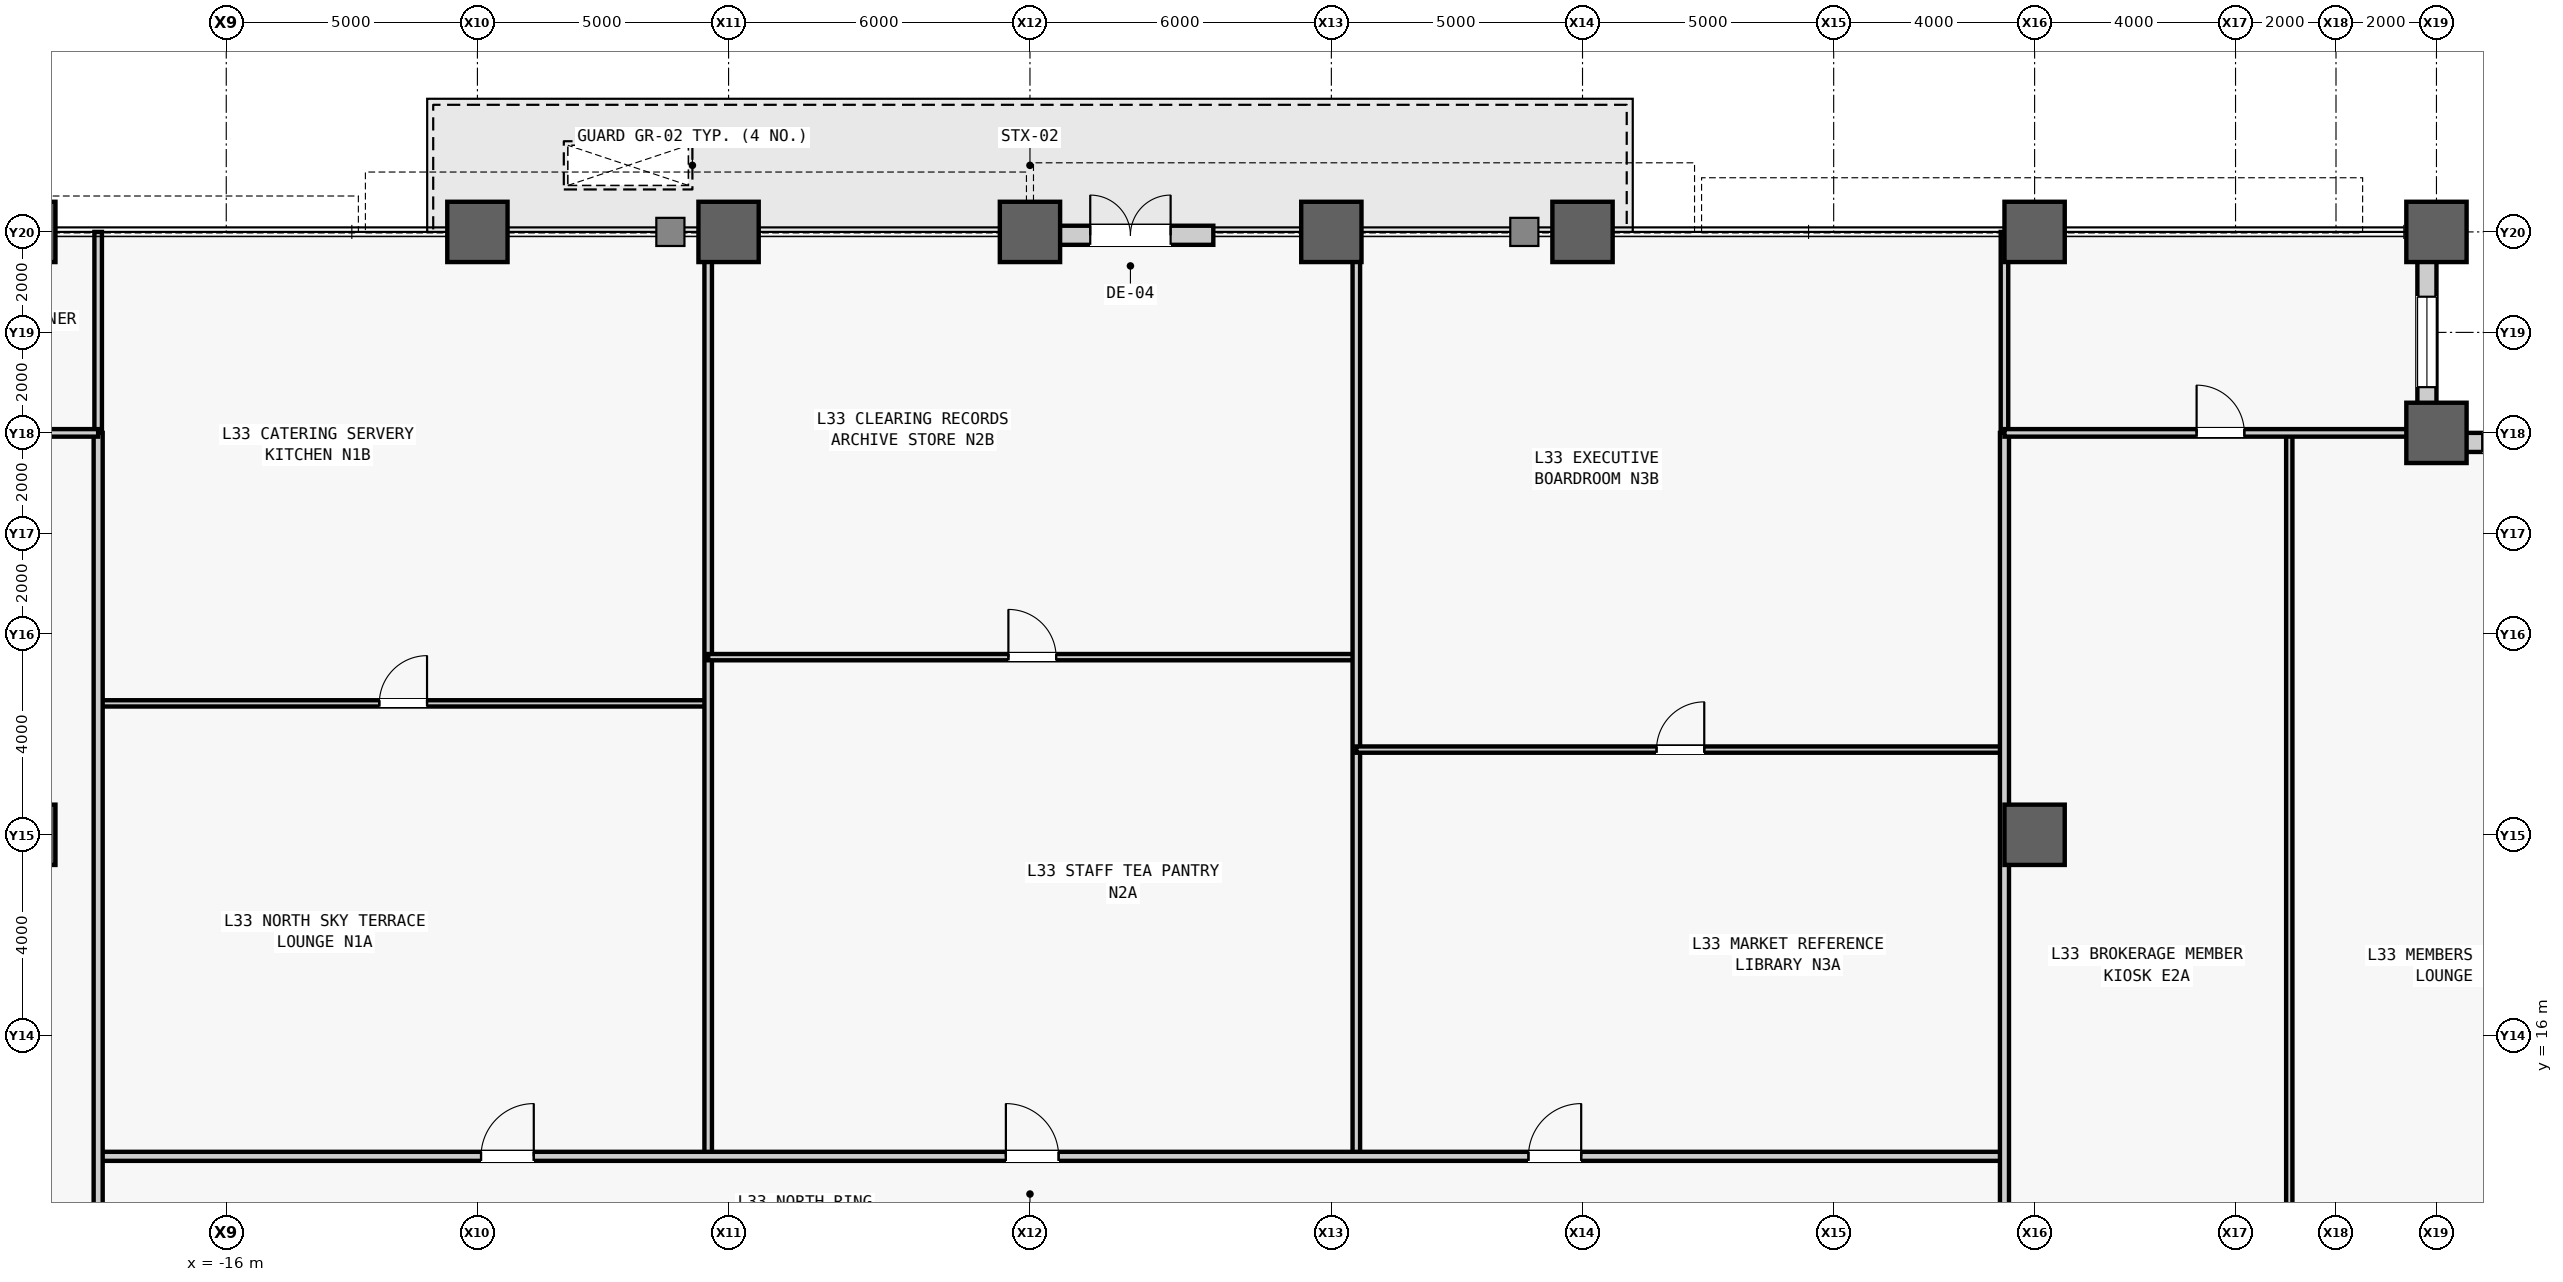
"""IFC4 building model, lengths in metres.
Left out: names, types, materials, properties, quantities, classifications, styles, units other than length and angle.
Written with IfcOpenShell. Run it as: python <this file> out.ifc"""

import sys

from ifc_helpers import new_model, si_unit, direction, frame, frame_2d, origin, origin_2d, place, context, subcontext, project, spatial, rectangle, hollow_rectangle, extrude, source, transform, mapped, element, fill, save


model = new_model("IFC4")
c1 = context("Model", 3, precision=1e-05, world=origin(), true_north=direction((0.0, 1.0)))
c2 = subcontext(c1, "Body", "Model", "MODEL_VIEW")
j1 = project(units=[si_unit("LENGTHUNIT", "METRE"), si_unit("PLANEANGLEUNIT", "RADIAN")], contexts=[c1])
p1 = place(None, origin())
s1 = spatial("IfcSite", under=j1, at=p1, CompositionType="ELEMENT")
p2 = place(p1, origin())
s2 = spatial("IfcBuilding", under=s1, at=p2, CompositionType="ELEMENT")
p3 = place(p2, frame((0.0, 0.0, 144.7)))
s3 = spatial("IfcBuildingStorey", under=s2, at=p3, CompositionType="ELEMENT", Elevation=144.7)
m1 = source(origin(), c2, "Body", "SweptSolid", [
    extrude(hollow_rectangle(XDim=1.2, YDim=1.2, WallThickness=0.07, at=origin_2d()), origin(), (0.0, 0.0, 1.0), 5.2),
])
for number, where, z_axis, x_axis in (
    (1, (-20.0, 20.0, 0.0), (0.0, 0.0, 1.0), (1.0, 0.0, 0.0)),
    (2, (-20.0, 32.0, 0.0), (0.0, 0.0, 1.0), (1.0, 0.0, 0.0)),
    (3, (-11.0, 32.0, 0.0), (0.0, 0.0, 1.0), (1.0, 0.0, 0.0)),
    (4, (-6.0, 32.0, 0.0), (0.0, 0.0, 1.0), (1.0, 0.0, 0.0)),
    (5, (0.0, 32.0, 0.0), (0.0, 0.0, 1.0), (1.0, 0.0, 0.0)),
    (6, (6.0, 32.0, 0.0), (0.0, 0.0, 1.0), (1.0, 0.0, 0.0)),
    (7, (11.0, 32.0, 0.0), (0.0, 0.0, 1.0), (1.0, 0.0, 0.0)),
    (8, (20.0, 20.0, 0.0), (0.0, 0.0, 1.0), (1.0, 0.0, 0.0)),
    (9, (20.0, 32.0, 0.0), (0.0, 0.0, 1.0), (1.0, 0.0, 0.0)),
    (10, (28.0, 28.0, 0.0), (0.0, 0.0, 1.0), (1.0, 0.0, 0.0)),
    (11, (28.0, 32.0, 0.0), (0.0, 0.0, 1.0), (1.0, 0.0, 0.0)),
):
    element("IfcColumn", number, at=place(p3, frame(where, z_axis=z_axis, x_axis=x_axis)), inside=s3, PredefinedType="COLUMN", context=c2, shape_type="MappedRepresentation", body=[
        mapped(m1, transform((0.0, 0.0, 0.0), scale=1.0)),
    ])
m2 = source(origin(), c2, "Body", "SweptSolid", [
    extrude(rectangle(XDim=3.62, YDim=0.38, at=frame_2d((1.81, 0.0))), origin(), (0.0, 0.0, 1.0), 3.905),
])
p4 = place(p3, frame((28.0, 27.81, 0.0), z_axis=(0.0, 0.0, 1.0), x_axis=(1.0, 0.0, 0.0)))
e12 = element("IfcWall", 12, at=p4, inside=s3, PredefinedType="STANDARD", context=c2, shape_type="MappedRepresentation", body=[
    mapped(m2, transform((0.0, 0.0, 0.0), scale=1.0)),
])
m3 = source(origin(), c2, "Body", "SweptSolid", [
    extrude(rectangle(XDim=1.8, YDim=2.4, at=frame_2d((0.9, 1.2))), frame((0.0, 0.2, 0.0), z_axis=(0.0, -1.0, 0.0), x_axis=(1.0, 0.0, 0.0)), (0.0, 0.0, 1.0), 0.4),
])
p5 = place(p4, frame((0.91, 0.0, 0.7)))
e13 = element("IfcOpeningElement", 13, at=p5, cuts=e12, PredefinedType="OPENING", context=c2, shape_type="MappedRepresentation", body=[
    mapped(m3, transform((0.0, 0.0, 0.0), scale=1.0)),
])
p6 = place(p3, frame((27.81, 28.0, 0.0), z_axis=(0.0, 0.0, 1.0), x_axis=(0.0, 1.0, 0.0)))
e14 = element("IfcWall", 14, at=p6, inside=s3, PredefinedType="STANDARD", context=c2, shape_type="MappedRepresentation", body=[
    mapped(m2, transform((0.0, 0.0, 0.0), scale=1.0)),
])
p7 = place(p6, frame((0.91, 0.0, 0.7)))
e15 = element("IfcOpeningElement", 15, at=p7, cuts=e14, PredefinedType="OPENING", context=c2, shape_type="MappedRepresentation", body=[
    mapped(m3, transform((0.0, 0.0, 0.0), scale=1.0)),
])
m4 = source(origin(), c2, "Body", "SweptSolid", [
    extrude(rectangle(XDim=3.3, YDim=0.38, at=frame_2d((1.65, 0.0))), origin(), (0.0, 0.0, 1.0), 3.905),
])
p8 = place(p3, frame((0.35, 31.933, 0.0), z_axis=(0.0, 0.0, 1.0), x_axis=(1.0, 0.0, 0.0)))
e16 = element("IfcWall", 16, at=p8, inside=s3, PredefinedType="STANDARD", context=c2, shape_type="MappedRepresentation", body=[
    mapped(m4, transform((0.0, 0.0, 0.0), scale=1.0)),
])
m5 = source(origin(), c2, "Body", "SweptSolid", [
    extrude(rectangle(XDim=1.6, YDim=2.25, at=frame_2d((0.8, 1.125))), frame((0.0, 0.2, 0.0), z_axis=(0.0, -1.0, 0.0), x_axis=(1.0, 0.0, 0.0)), (0.0, 0.0, 1.0), 0.4),
])
p9 = place(p8, frame((0.85, 0.0, 0.0)))
e17 = element("IfcOpeningElement", 17, at=p9, cuts=e16, PredefinedType="OPENING", context=c2, shape_type="MappedRepresentation", body=[
    mapped(m5, transform((0.0, 0.0, 0.0), scale=1.0)),
])
m6 = source(origin(), c2, "Body", "SweptSolid", [
    extrude(rectangle(XDim=12.144, YDim=0.125, at=frame_2d((6.072, 0.0))), origin(), (0.0, 0.0, 1.0), 4.6),
])
p10 = place(p3, frame((-18.55, 22.616, 0.0), z_axis=(0.0, 0.0, 1.0), x_axis=(1.0, 0.0, 0.0)))
e18 = element("IfcWall", 18, at=p10, inside=s3, PredefinedType="PARTITIONING", context=c2, shape_type="MappedRepresentation", body=[
    mapped(m6, transform((0.0, 0.0, 0.0), scale=1.0)),
])
m7 = source(origin(), c2, "Body", "SweptSolid", [
    extrude(rectangle(XDim=0.95, YDim=2.15, at=frame_2d((0.475, 1.075))), frame((0.0, 0.073, 0.0), z_axis=(0.0, -1.0, 0.0), x_axis=(1.0, 0.0, 0.0)), (0.0, 0.0, 1.0), 0.145),
])
p11 = place(p10, frame((5.597, 0.0, 0.0)))
e19 = element("IfcOpeningElement", 19, at=p11, cuts=e18, PredefinedType="OPENING", context=c2, shape_type="MappedRepresentation", body=[
    mapped(m7, transform((0.0, 0.0, 0.0), scale=1.0)),
])
m8 = source(origin(), c2, "Body", "SweptSolid", [
    extrude(rectangle(XDim=18.4, YDim=0.15, at=frame_2d((9.2, 0.0))), origin(), (0.0, 0.0, 1.0), 2.8),
])
p12 = place(p3, frame((-6.406, 13.6, 0.0), z_axis=(0.0, 0.0, 1.0), x_axis=(0.0, 1.0, 0.0)))
e20 = element("IfcWall", 20, at=p12, inside=s3, PredefinedType="PARTITIONING", context=c2, shape_type="MappedRepresentation", body=[
    mapped(m8, transform((0.0, 0.0, 0.0), scale=1.0)),
])
m9 = source(origin(), c2, "Body", "SweptSolid", [
    extrude(rectangle(XDim=12.903, YDim=0.125, at=frame_2d((6.452, 0.0))), origin(), (0.0, 0.0, 1.0), 4.6),
])
p13 = place(p3, frame((-6.406, 23.536, 0.0), z_axis=(0.0, 0.0, 1.0), x_axis=(1.0, 0.0, 0.0)))
e21 = element("IfcWall", 21, at=p13, inside=s3, PredefinedType="PARTITIONING", context=c2, shape_type="MappedRepresentation", body=[
    mapped(m9, transform((0.0, 0.0, 0.0), scale=1.0)),
])
p14 = place(p13, frame((5.977, 0.0, 0.0)))
e22 = element("IfcOpeningElement", 22, at=p14, cuts=e21, PredefinedType="OPENING", context=c2, shape_type="MappedRepresentation", body=[
    mapped(m7, transform((0.0, 0.0, 0.0), scale=1.0)),
])
m10 = source(origin(), c2, "Body", "SweptSolid", [
    extrude(rectangle(XDim=18.4, YDim=0.15, at=frame_2d((9.2, 0.0))), origin(), (0.0, 0.0, 1.0), 4.6),
])
p15 = place(p3, frame((6.497, 13.6, 0.0), z_axis=(0.0, 0.0, 1.0), x_axis=(0.0, 1.0, 0.0)))
e23 = element("IfcWall", 23, at=p15, inside=s3, PredefinedType="PARTITIONING", context=c2, shape_type="MappedRepresentation", body=[
    mapped(m10, transform((0.0, 0.0, 0.0), scale=1.0)),
])
m11 = source(origin(), c2, "Body", "SweptSolid", [
    extrude(rectangle(XDim=12.903, YDim=0.125, at=frame_2d((6.451, 0.0))), origin(), (0.0, 0.0, 1.0), 4.6),
])
p16 = place(p3, frame((6.497, 21.696, 0.0), z_axis=(0.0, 0.0, 1.0), x_axis=(1.0, 0.0, 0.0)))
e24 = element("IfcWall", 24, at=p16, inside=s3, PredefinedType="PARTITIONING", context=c2, shape_type="MappedRepresentation", body=[
    mapped(m11, transform((0.0, 0.0, 0.0), scale=1.0)),
])
p17 = place(p16, frame((5.977, 0.0, 0.0)))
e25 = element("IfcOpeningElement", 25, at=p17, cuts=e24, PredefinedType="OPENING", context=c2, shape_type="MappedRepresentation", body=[
    mapped(m7, transform((0.0, 0.0, 0.0), scale=1.0)),
])
m12 = source(origin(), c2, "Body", "SweptSolid", [
    extrude(rectangle(XDim=37.95, YDim=0.18, at=frame_2d((18.975, 0.0))), origin(), (0.0, 0.0, 1.0), 4.6),
])
p18 = place(p3, frame((-18.55, 13.6, 0.0), z_axis=(0.0, 0.0, 1.0), x_axis=(1.0, 0.0, 0.0)))
e26 = element("IfcWall", 26, at=p18, inside=s3, PredefinedType="PARTITIONING", context=c2, shape_type="MappedRepresentation", body=[
    mapped(m12, transform((0.0, 0.0, 0.0), scale=1.0)),
])
m13 = source(origin(), c2, "Body", "SweptSolid", [
    extrude(rectangle(XDim=1.05, YDim=2.2, at=frame_2d((0.525, 1.1))), frame((0.0, 0.1, 0.0), z_axis=(0.0, -1.0, 0.0), x_axis=(1.0, 0.0, 0.0)), (0.0, 0.0, 1.0), 0.2),
])
p19 = place(p18, frame((7.622, 0.0, 0.0)))
e27 = element("IfcOpeningElement", 27, at=p19, cuts=e26, PredefinedType="OPENING", context=c2, shape_type="MappedRepresentation", body=[
    mapped(m13, transform((0.0, 0.0, 0.0), scale=1.0)),
])
p20 = place(p18, frame((18.071, 0.0, 0.0)))
e28 = element("IfcOpeningElement", 28, at=p20, cuts=e26, PredefinedType="OPENING", context=c2, shape_type="MappedRepresentation", body=[
    mapped(m13, transform((0.0, 0.0, 0.0), scale=1.0)),
])
p21 = place(p18, frame((28.473, 0.0, 0.0)))
e29 = element("IfcOpeningElement", 29, at=p21, cuts=e26, PredefinedType="OPENING", context=c2, shape_type="MappedRepresentation", body=[
    mapped(m13, transform((0.0, 0.0, 0.0), scale=1.0)),
])
m14 = source(origin(), c2, "Body", "SweptSolid", [
    extrude(rectangle(XDim=4.0, YDim=0.15, at=frame_2d((2.0, 0.0))), origin(), (0.0, 0.0, 1.0), 4.6),
])
for number, where, z_axis, x_axis in (
    (30, (-18.55, 28.0, 0.0), (0.0, 0.0, 1.0), (0.0, 1.0, 0.0)),
    (31, (19.4, 28.0, 0.0), (0.0, 0.0, 1.0), (0.0, 1.0, 0.0)),
):
    element("IfcWall", number, at=place(p3, frame(where, z_axis=z_axis, x_axis=x_axis)), inside=s3, PredefinedType="PARTITIONING", context=c2, shape_type="MappedRepresentation", body=[
        mapped(m14, transform((0.0, 0.0, 0.0), scale=1.0)),
    ])
m15 = source(origin(), c2, "Body", "SweptSolid", [
    extrude(rectangle(XDim=56.0, YDim=0.18, at=frame_2d((28.0, 0.0))), origin(), (0.0, 0.0, 1.0), 4.6),
])
p22 = place(p3, frame((-18.55, -28.0, 0.0), z_axis=(0.0, 0.0, 1.0), x_axis=(0.0, 1.0, 0.0)))
e32 = element("IfcWall", 32, at=p22, inside=s3, PredefinedType="PARTITIONING", context=c2, shape_type="MappedRepresentation", body=[
    mapped(m15, transform((0.0, 0.0, 0.0), scale=1.0)),
])
m16 = source(origin(), c2, "Body", "SweptSolid", [
    extrude(rectangle(XDim=0.95, YDim=2.15, at=frame_2d((0.475, 1.075))), frame((0.0, 0.1, 0.0), z_axis=(0.0, -1.0, 0.0), x_axis=(1.0, 0.0, 0.0)), (0.0, 0.0, 1.0), 0.2),
])
p23 = place(p22, frame((27.25, 0.0, 0.0)))
e33 = element("IfcOpeningElement", 33, at=p23, cuts=e32, PredefinedType="OPENING", context=c2, shape_type="MappedRepresentation", body=[
    mapped(m16, transform((0.0, 0.0, 0.0), scale=1.0)),
])
m17 = source(origin(), c2, "Body", "SweptSolid", [
    extrude(rectangle(XDim=28.83, YDim=0.125, at=frame_2d((14.415, 0.0))), origin(), (0.0, 0.0, 1.0), 2.8),
])
p24 = place(p3, frame((25.07, -0.83, 0.0), z_axis=(0.0, 0.0, 1.0), x_axis=(0.0, 1.0, 0.0)))
e34 = element("IfcWall", 34, at=p24, inside=s3, PredefinedType="PARTITIONING", context=c2, shape_type="MappedRepresentation", body=[
    mapped(m17, transform((0.0, 0.0, 0.0), scale=1.0)),
])
p25 = place(p24, frame((6.74, 0.0, 0.0)))
e35 = element("IfcOpeningElement", 35, at=p25, cuts=e34, PredefinedType="OPENING", context=c2, shape_type="MappedRepresentation", body=[
    mapped(m7, transform((0.0, 0.0, 0.0), scale=1.0)),
])
m18 = source(origin(), c2, "Body", "SweptSolid", [
    extrude(rectangle(XDim=56.0, YDim=0.18, at=frame_2d((28.0, 0.0))), origin(), (0.0, 0.0, 1.0), 4.131),
])
p26 = place(p3, frame((19.4, -28.0, 0.0), z_axis=(0.0, 0.0, 1.0), x_axis=(0.0, 1.0, 0.0)))
e36 = element("IfcWall", 36, at=p26, inside=s3, PredefinedType="PARTITIONING", context=c2, shape_type="MappedRepresentation", body=[
    mapped(m18, transform((0.0, 0.0, 0.0), scale=1.0)),
])
p27 = place(p26, frame((20.335, 0.0, 0.0)))
e37 = element("IfcOpeningElement", 37, at=p27, cuts=e36, PredefinedType="OPENING", context=c2, shape_type="MappedRepresentation", body=[
    mapped(m16, transform((0.0, 0.0, 0.0), scale=1.0)),
])
p28 = place(p26, frame((33.61, 0.0, 0.0)))
e38 = element("IfcOpeningElement", 38, at=p28, cuts=e36, PredefinedType="OPENING", context=c2, shape_type="MappedRepresentation", body=[
    mapped(m16, transform((0.0, 0.0, 0.0), scale=1.0)),
])
m19 = source(origin(), c2, "Body", "SweptSolid", [
    extrude(rectangle(XDim=9.45, YDim=0.15, at=frame_2d((4.725, 0.0))), origin(), (0.0, 0.0, 1.0), 4.6),
])
p29 = place(p3, frame((-28.0, 28.0, 0.0), z_axis=(0.0, 0.0, 1.0), x_axis=(1.0, 0.0, 0.0)))
e39 = element("IfcWall", 39, at=p29, inside=s3, PredefinedType="PARTITIONING", context=c2, shape_type="MappedRepresentation", body=[
    mapped(m19, transform((0.0, 0.0, 0.0), scale=1.0)),
])
m20 = source(origin(), c2, "Body", "SweptSolid", [
    extrude(rectangle(XDim=0.95, YDim=2.15, at=frame_2d((0.475, 1.075))), frame((0.0, 0.085, 0.0), z_axis=(0.0, -1.0, 0.0), x_axis=(1.0, 0.0, 0.0)), (0.0, 0.0, 1.0), 0.17),
])
p30 = place(p29, frame((4.25, 0.0, 0.0)))
e40 = element("IfcOpeningElement", 40, at=p30, cuts=e39, PredefinedType="OPENING", context=c2, shape_type="MappedRepresentation", body=[
    mapped(m20, transform((0.0, 0.0, 0.0), scale=1.0)),
])
m21 = source(origin(), c2, "Body", "SweptSolid", [
    extrude(rectangle(XDim=8.6, YDim=0.15, at=frame_2d((4.3, 0.0))), origin(), (0.0, 0.0, 1.0), 4.6),
])
p31 = place(p3, frame((19.4, 28.0, 0.0), z_axis=(0.0, 0.0, 1.0), x_axis=(1.0, 0.0, 0.0)))
e41 = element("IfcWall", 41, at=p31, inside=s3, PredefinedType="PARTITIONING", context=c2, shape_type="MappedRepresentation", body=[
    mapped(m21, transform((0.0, 0.0, 0.0), scale=1.0)),
])
p32 = place(p31, frame((3.825, 0.0, 0.0)))
e42 = element("IfcOpeningElement", 42, at=p32, cuts=e41, PredefinedType="OPENING", context=c2, shape_type="MappedRepresentation", body=[
    mapped(m20, transform((0.0, 0.0, 0.0), scale=1.0)),
])
m22 = source(origin(), c2, "Body", "SweptSolid", [
    extrude(rectangle(XDim=1.8, YDim=2.4, at=frame_2d((0.9, 1.2))), frame((0.0, 0.03, 0.0), z_axis=(0.0, -1.0, 0.0), x_axis=(1.0, 0.0, 0.0)), (0.0, 0.0, 1.0), 0.06),
])
p33 = place(p5, origin())
e43 = element("IfcWindow", 43, at=p33, inside=s3, PartitioningType="SINGLE_PANEL", PredefinedType="WINDOW", context=c2, shape_type="MappedRepresentation", body=[
    mapped(m22, transform((0.0, 0.0, 0.0), scale=1.0)),
])
fill(e13, e43)
p34 = place(p7, origin())
e44 = element("IfcWindow", 44, at=p34, inside=s3, PartitioningType="SINGLE_PANEL", PredefinedType="WINDOW", context=c2, shape_type="MappedRepresentation", body=[
    mapped(m22, transform((0.0, 0.0, 0.0), scale=1.0)),
])
fill(e15, e44)
m23 = source(origin(), c2, "Body", "SweptSolid", [
    extrude(rectangle(XDim=1.6, YDim=2.25, at=frame_2d((0.8, 1.125))), frame((0.0, 0.025, 0.0), z_axis=(0.0, -1.0, 0.0), x_axis=(1.0, 0.0, 0.0)), (0.0, 0.0, 1.0), 0.05),
])
p35 = place(p9, origin())
e45 = element("IfcDoor", 45, at=p35, inside=s3, OperationType="DOUBLE_DOOR_SINGLE_SWING", PredefinedType="DOOR", context=c2, shape_type="MappedRepresentation", body=[
    mapped(m23, transform((0.0, 0.0, 0.0), scale=1.0)),
])
fill(e17, e45)
m24 = source(origin(), c2, "Body", "SweptSolid", [
    extrude(rectangle(XDim=0.95, YDim=2.15, at=frame_2d((0.475, 1.075))), frame((0.0, 0.025, 0.0), z_axis=(0.0, -1.0, 0.0), x_axis=(1.0, 0.0, 0.0)), (0.0, 0.0, 1.0), 0.05),
])
p36 = place(p11, origin())
e46 = element("IfcDoor", 46, at=p36, inside=s3, OperationType="SINGLE_SWING_RIGHT", PredefinedType="DOOR", context=c2, shape_type="MappedRepresentation", body=[
    mapped(m24, transform((0.0, 0.0, 0.0), scale=1.0)),
])
fill(e19, e46)
p37 = place(p14, origin())
e47 = element("IfcDoor", 47, at=p37, inside=s3, OperationType="SINGLE_SWING_LEFT", PredefinedType="DOOR", context=c2, shape_type="MappedRepresentation", body=[
    mapped(m24, transform((0.0, 0.0, 0.0), scale=1.0)),
])
fill(e22, e47)
p38 = place(p17, origin())
e48 = element("IfcDoor", 48, at=p38, inside=s3, OperationType="SINGLE_SWING_RIGHT", PredefinedType="DOOR", context=c2, shape_type="MappedRepresentation", body=[
    mapped(m24, transform((0.0, 0.0, 0.0), scale=1.0)),
])
fill(e25, e48)
m25 = source(origin(), c2, "Body", "SweptSolid", [
    extrude(rectangle(XDim=1.05, YDim=2.2, at=frame_2d((0.525, 1.1))), frame((0.0, 0.025, 0.0), z_axis=(0.0, -1.0, 0.0), x_axis=(1.0, 0.0, 0.0)), (0.0, 0.0, 1.0), 0.05),
])
p39 = place(p19, origin())
e49 = element("IfcDoor", 49, at=p39, inside=s3, OperationType="SINGLE_SWING_RIGHT", PredefinedType="DOOR", context=c2, shape_type="MappedRepresentation", body=[
    mapped(m25, transform((0.0, 0.0, 0.0), scale=1.0)),
])
fill(e27, e49)
p40 = place(p20, origin())
e50 = element("IfcDoor", 50, at=p40, inside=s3, OperationType="SINGLE_SWING_LEFT", PredefinedType="DOOR", context=c2, shape_type="MappedRepresentation", body=[
    mapped(m25, transform((0.0, 0.0, 0.0), scale=1.0)),
])
fill(e28, e50)
p41 = place(p21, origin())
e51 = element("IfcDoor", 51, at=p41, inside=s3, OperationType="SINGLE_SWING_RIGHT", PredefinedType="DOOR", context=c2, shape_type="MappedRepresentation", body=[
    mapped(m25, transform((0.0, 0.0, 0.0), scale=1.0)),
])
fill(e29, e51)
p42 = place(p32, origin())
e52 = element("IfcDoor", 52, at=p42, inside=s3, OperationType="SINGLE_SWING_LEFT", PredefinedType="DOOR", context=c2, shape_type="MappedRepresentation", body=[
    mapped(m24, transform((0.0, 0.0, 0.0), scale=1.0)),
])
fill(e42, e52)
save(model, sys.argv[1])
